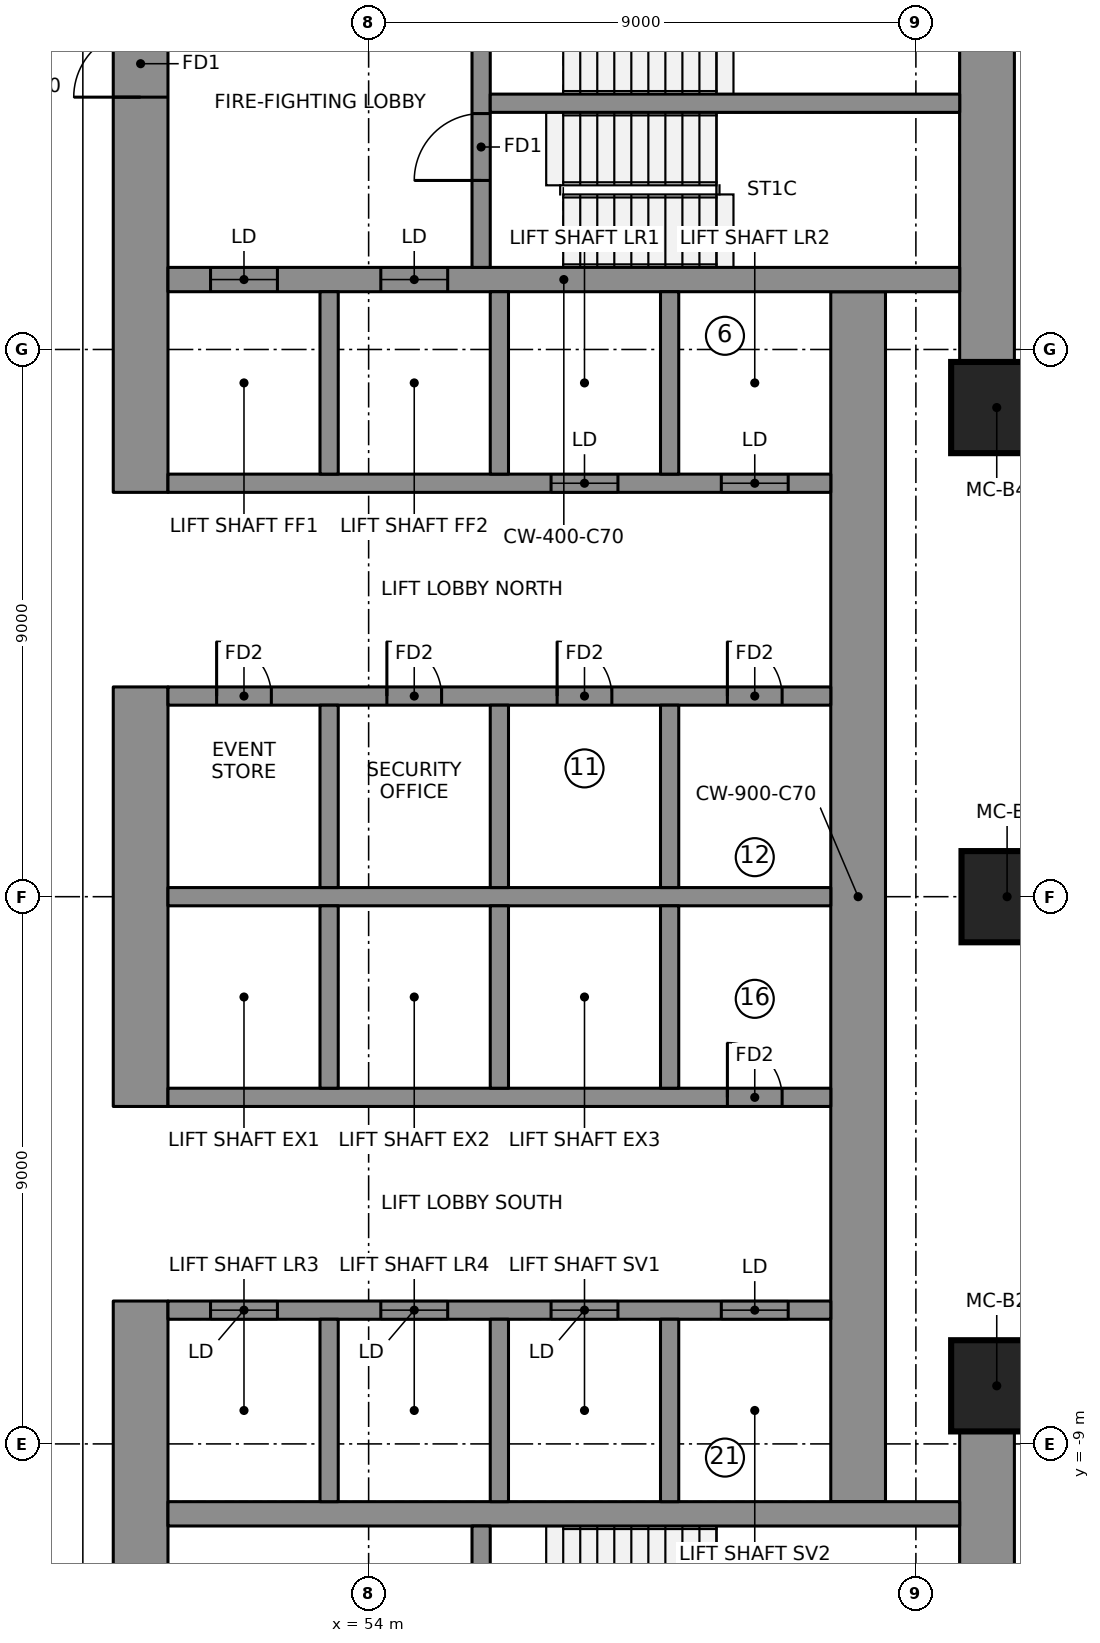
"""IFC4 building model, lengths in metres.
Left out: names, types, materials, properties, quantities, classifications, styles, units other than length and angle.
Written with IfcOpenShell. Run it as: python <this file> out.ifc"""

import sys

from ifc_helpers import new_model, si_unit, direction, frame, frame_2d, origin, origin_2d, place, context, subcontext, project, spatial, rectangle, extrude, element, fill, save


model = new_model("IFC4")
c1 = context("Model", 3, precision=1e-05, world=origin(), true_north=direction((0.0, 1.0)))
c2 = subcontext(c1, "Body", "Model", "MODEL_VIEW")
j1 = project(units=[si_unit("LENGTHUNIT", "METRE"), si_unit("PLANEANGLEUNIT", "RADIAN")], contexts=[c1])
p1 = place(None, origin())
s1 = spatial("IfcSite", under=j1, at=p1, CompositionType="ELEMENT")
p2 = place(p1, origin())
s2 = spatial("IfcBuilding", under=s1, at=p2, CompositionType="ELEMENT")
p3 = place(p2, frame((0.0, 0.0, 137.3)))
s3 = spatial("IfcBuildingStorey", under=s2, at=p3, CompositionType="ELEMENT", Elevation=137.3)
p4 = place(p3, frame((50.25, 6.65, 0.0), z_axis=(0.0, 0.0, 1.0), x_axis=(0.0, 1.0, 0.0)))
e1 = element("IfcWall", 1, at=p4, inside=s3, PredefinedType="SHEAR", context=c2, shape_type="SweptSolid", body=[
    extrude(rectangle(XDim=10.0, YDim=0.9, at=frame_2d((5.0, 0.0))), origin(), (0.0, 0.0, 1.0), 3.55),
])
p5 = place(p4, frame((6.5, 0.0, 0.0)))
e2 = element("IfcOpeningElement", 2, at=p5, cuts=e1, PredefinedType="OPENING", context=c2, shape_type="SweptSolid", body=[
    extrude(rectangle(XDim=1.1, YDim=2.1, at=frame_2d((0.55, 1.05))), frame((0.0, 0.46, 0.0), z_axis=(0.0, -1.0, 0.0), x_axis=(1.0, 0.0, 0.0)), (0.0, 0.0, 1.0), 0.92),
])
p6 = place(p3, frame((50.25, -3.45, 0.0), z_axis=(0.0, 0.0, 1.0), x_axis=(0.0, 1.0, 0.0)))
e3 = element("IfcWall", 3, at=p6, inside=s3, PredefinedType="SHEAR", context=c2, shape_type="SweptSolid", body=[
    extrude(rectangle(XDim=6.9, YDim=0.9, at=frame_2d((3.45, 0.0))), origin(), (0.0, 0.0, 1.0), 3.55),
])
p7 = place(p3, frame((50.25, -16.65, 0.0), z_axis=(0.0, 0.0, 1.0), x_axis=(0.0, 1.0, 0.0)))
e4 = element("IfcWall", 4, at=p7, inside=s3, PredefinedType="SHEAR", context=c2, shape_type="SweptSolid", body=[
    extrude(rectangle(XDim=10.0, YDim=0.9, at=frame_2d((5.0, 0.0))), origin(), (0.0, 0.0, 1.0), 3.55),
])
p8 = place(p7, frame((2.4, 0.0, 0.0)))
e5 = element("IfcOpeningElement", 5, at=p8, cuts=e4, PredefinedType="OPENING", context=c2, shape_type="SweptSolid", body=[
    extrude(rectangle(XDim=1.1, YDim=2.1, at=frame_2d((0.55, 1.05))), frame((0.0, 0.46, 0.0), z_axis=(0.0, -1.0, 0.0), x_axis=(1.0, 0.0, 0.0)), (0.0, 0.0, 1.0), 0.92),
])
for number, where, z_axis, x_axis in (
    (6, (64.17, 8.745, 0.0), (0.0, 0.0, 1.0), (0.0, 1.0, 0.0)),
    (7, (64.17, -15.75, 0.0), (0.0, 0.0, 1.0), (0.0, 1.0, 0.0)),
):
    element("IfcWall", number, at=place(p3, frame(where, z_axis=z_axis, x_axis=x_axis)), inside=s3, PredefinedType="SHEAR", context=c2, shape_type="SweptSolid", body=[
        extrude(rectangle(XDim=7.005, YDim=0.9, at=frame_2d((3.503, 0.0))), origin(), (0.0, 0.0, 1.0), 3.55),
    ])
p9 = place(p3, frame((62.05, -9.95, 0.0), z_axis=(0.0, 0.0, 1.0), x_axis=(0.0, 1.0, 0.0)))
e8 = element("IfcWall", 8, at=p9, inside=s3, PredefinedType="SHEAR", context=c2, shape_type="SweptSolid", body=[
    extrude(rectangle(XDim=19.9, YDim=0.9, at=frame_2d((9.95, 0.0))), origin(), (0.0, 0.0, 1.0), 3.55),
])
p10 = place(p3, frame((50.7, 10.15, 0.0), z_axis=(0.0, 0.0, 1.0), x_axis=(1.0, 0.0, 0.0)))
e9 = element("IfcWall", 9, at=p10, inside=s3, PredefinedType="SHEAR", context=c2, shape_type="SweptSolid", body=[
    extrude(rectangle(XDim=13.02, YDim=0.4, at=frame_2d((6.51, 0.0))), origin(), (0.0, 0.0, 1.0), 3.55),
])
p11 = place(p10, frame((0.7, 0.0, 0.0)))
e10 = element("IfcOpeningElement", 10, at=p11, cuts=e9, PredefinedType="OPENING", context=c2, shape_type="SweptSolid", body=[
    extrude(rectangle(XDim=1.1, YDim=2.1, at=frame_2d((0.55, 1.05))), frame((0.0, 0.21, 0.0), z_axis=(0.0, -1.0, 0.0), x_axis=(1.0, 0.0, 0.0)), (0.0, 0.0, 1.0), 0.42),
])
p12 = place(p10, frame((3.5, 0.0, 0.0)))
e11 = element("IfcOpeningElement", 11, at=p12, cuts=e9, PredefinedType="OPENING", context=c2, shape_type="SweptSolid", body=[
    extrude(rectangle(XDim=1.1, YDim=2.1, at=frame_2d((0.55, 1.05))), frame((0.0, 0.21, 0.0), z_axis=(0.0, -1.0, 0.0), x_axis=(1.0, 0.0, 0.0)), (0.0, 0.0, 1.0), 0.42),
])
p13 = place(p3, frame((50.7, -10.15, 0.0), z_axis=(0.0, 0.0, 1.0), x_axis=(1.0, 0.0, 0.0)))
e12 = element("IfcWall", 12, at=p13, inside=s3, PredefinedType="SHEAR", context=c2, shape_type="SweptSolid", body=[
    extrude(rectangle(XDim=13.02, YDim=0.4, at=frame_2d((6.51, 0.0))), origin(), (0.0, 0.0, 1.0), 3.55),
])
p14 = place(p3, frame((50.7, 0.0, 0.0), z_axis=(0.0, 0.0, 1.0), x_axis=(1.0, 0.0, 0.0)))
e13 = element("IfcWall", 13, at=p14, inside=s3, PredefinedType="SHEAR", context=c2, shape_type="SweptSolid", body=[
    extrude(rectangle(XDim=10.9, YDim=0.3, at=frame_2d((5.45, 0.0))), origin(), (0.0, 0.0, 1.0), 3.55),
])
p15 = place(p3, frame((50.7, 3.3, 0.0), z_axis=(0.0, 0.0, 1.0), x_axis=(1.0, 0.0, 0.0)))
e14 = element("IfcWall", 14, at=p15, inside=s3, PredefinedType="SHEAR", context=c2, shape_type="SweptSolid", body=[
    extrude(rectangle(XDim=10.9, YDim=0.3, at=frame_2d((5.45, 0.0))), origin(), (0.0, 0.0, 1.0), 3.55),
])
p16 = place(p15, frame((0.8, 0.0, 0.0)))
e15 = element("IfcOpeningElement", 15, at=p16, cuts=e14, PredefinedType="OPENING", context=c2, shape_type="SweptSolid", body=[
    extrude(rectangle(XDim=0.9, YDim=2.1, at=frame_2d((0.45, 1.05))), frame((0.0, 0.16, 0.0), z_axis=(0.0, -1.0, 0.0), x_axis=(1.0, 0.0, 0.0)), (0.0, 0.0, 1.0), 0.32),
])
p17 = place(p15, frame((3.6, 0.0, 0.0)))
e16 = element("IfcOpeningElement", 16, at=p17, cuts=e14, PredefinedType="OPENING", context=c2, shape_type="SweptSolid", body=[
    extrude(rectangle(XDim=0.9, YDim=2.1, at=frame_2d((0.45, 1.05))), frame((0.0, 0.16, 0.0), z_axis=(0.0, -1.0, 0.0), x_axis=(1.0, 0.0, 0.0)), (0.0, 0.0, 1.0), 0.32),
])
p18 = place(p15, frame((6.4, 0.0, 0.0)))
e17 = element("IfcOpeningElement", 17, at=p18, cuts=e14, PredefinedType="OPENING", context=c2, shape_type="SweptSolid", body=[
    extrude(rectangle(XDim=0.9, YDim=2.1, at=frame_2d((0.45, 1.05))), frame((0.0, 0.16, 0.0), z_axis=(0.0, -1.0, 0.0), x_axis=(1.0, 0.0, 0.0)), (0.0, 0.0, 1.0), 0.32),
])
p19 = place(p15, frame((9.2, 0.0, 0.0)))
e18 = element("IfcOpeningElement", 18, at=p19, cuts=e14, PredefinedType="OPENING", context=c2, shape_type="SweptSolid", body=[
    extrude(rectangle(XDim=0.9, YDim=2.1, at=frame_2d((0.45, 1.05))), frame((0.0, 0.16, 0.0), z_axis=(0.0, -1.0, 0.0), x_axis=(1.0, 0.0, 0.0)), (0.0, 0.0, 1.0), 0.32),
])
p20 = place(p3, frame((50.7, 6.8, 0.0), z_axis=(0.0, 0.0, 1.0), x_axis=(1.0, 0.0, 0.0)))
e19 = element("IfcWall", 19, at=p20, inside=s3, PredefinedType="SHEAR", context=c2, shape_type="SweptSolid", body=[
    extrude(rectangle(XDim=10.9, YDim=0.3, at=frame_2d((5.45, 0.0))), origin(), (0.0, 0.0, 1.0), 3.55),
])
p21 = place(p20, frame((6.3, 0.0, 0.0)))
e20 = element("IfcOpeningElement", 20, at=p21, cuts=e19, PredefinedType="OPENING", context=c2, shape_type="SweptSolid", body=[
    extrude(rectangle(XDim=1.1, YDim=2.1, at=frame_2d((0.55, 1.05))), frame((0.0, 0.16, 0.0), z_axis=(0.0, -1.0, 0.0), x_axis=(1.0, 0.0, 0.0)), (0.0, 0.0, 1.0), 0.32),
])
p22 = place(p20, frame((9.1, 0.0, 0.0)))
e21 = element("IfcOpeningElement", 21, at=p22, cuts=e19, PredefinedType="OPENING", context=c2, shape_type="SweptSolid", body=[
    extrude(rectangle(XDim=1.1, YDim=2.1, at=frame_2d((0.55, 1.05))), frame((0.0, 0.16, 0.0), z_axis=(0.0, -1.0, 0.0), x_axis=(1.0, 0.0, 0.0)), (0.0, 0.0, 1.0), 0.32),
])
for number, where, z_axis, x_axis in (
    (22, (53.35, 0.15, 0.0), (0.0, 0.0, 1.0), (0.0, 1.0, 0.0)),
    (23, (53.35, 6.95, 0.0), (0.0, 0.0, 1.0), (0.0, 1.0, 0.0)),
    (24, (56.15, 0.15, 0.0), (0.0, 0.0, 1.0), (0.0, 1.0, 0.0)),
    (25, (56.15, 6.95, 0.0), (0.0, 0.0, 1.0), (0.0, 1.0, 0.0)),
    (26, (58.95, 0.15, 0.0), (0.0, 0.0, 1.0), (0.0, 1.0, 0.0)),
    (27, (58.95, 6.95, 0.0), (0.0, 0.0, 1.0), (0.0, 1.0, 0.0)),
):
    element("IfcWall", number, at=place(p3, frame(where, z_axis=z_axis, x_axis=x_axis)), inside=s3, PredefinedType="SHEAR", context=c2, shape_type="SweptSolid", body=[
        extrude(rectangle(XDim=3.0, YDim=0.3, at=frame_2d((1.5, 0.0))), origin(), (0.0, 0.0, 1.0), 3.55),
    ])
p23 = place(p3, frame((50.7, -3.3, 0.0), z_axis=(0.0, 0.0, 1.0), x_axis=(1.0, 0.0, 0.0)))
e28 = element("IfcWall", 28, at=p23, inside=s3, PredefinedType="SHEAR", context=c2, shape_type="SweptSolid", body=[
    extrude(rectangle(XDim=10.9, YDim=0.3, at=frame_2d((5.45, 0.0))), origin(), (0.0, 0.0, 1.0), 3.55),
])
p24 = place(p23, frame((9.2, 0.0, 0.0)))
e29 = element("IfcOpeningElement", 29, at=p24, cuts=e28, PredefinedType="OPENING", context=c2, shape_type="SweptSolid", body=[
    extrude(rectangle(XDim=0.9, YDim=2.1, at=frame_2d((0.45, 1.05))), frame((0.0, 0.16, 0.0), z_axis=(0.0, -1.0, 0.0), x_axis=(1.0, 0.0, 0.0)), (0.0, 0.0, 1.0), 0.32),
])
p25 = place(p3, frame((50.7, -6.8, 0.0), z_axis=(0.0, 0.0, 1.0), x_axis=(1.0, 0.0, 0.0)))
e30 = element("IfcWall", 30, at=p25, inside=s3, PredefinedType="SHEAR", context=c2, shape_type="SweptSolid", body=[
    extrude(rectangle(XDim=10.9, YDim=0.3, at=frame_2d((5.45, 0.0))), origin(), (0.0, 0.0, 1.0), 3.55),
])
p26 = place(p25, frame((0.7, 0.0, 0.0)))
e31 = element("IfcOpeningElement", 31, at=p26, cuts=e30, PredefinedType="OPENING", context=c2, shape_type="SweptSolid", body=[
    extrude(rectangle(XDim=1.1, YDim=2.1, at=frame_2d((0.55, 1.05))), frame((0.0, 0.16, 0.0), z_axis=(0.0, -1.0, 0.0), x_axis=(1.0, 0.0, 0.0)), (0.0, 0.0, 1.0), 0.32),
])
p27 = place(p25, frame((3.5, 0.0, 0.0)))
e32 = element("IfcOpeningElement", 32, at=p27, cuts=e30, PredefinedType="OPENING", context=c2, shape_type="SweptSolid", body=[
    extrude(rectangle(XDim=1.1, YDim=2.1, at=frame_2d((0.55, 1.05))), frame((0.0, 0.16, 0.0), z_axis=(0.0, -1.0, 0.0), x_axis=(1.0, 0.0, 0.0)), (0.0, 0.0, 1.0), 0.32),
])
p28 = place(p25, frame((6.3, 0.0, 0.0)))
e33 = element("IfcOpeningElement", 33, at=p28, cuts=e30, PredefinedType="OPENING", context=c2, shape_type="SweptSolid", body=[
    extrude(rectangle(XDim=1.1, YDim=2.1, at=frame_2d((0.55, 1.05))), frame((0.0, 0.16, 0.0), z_axis=(0.0, -1.0, 0.0), x_axis=(1.0, 0.0, 0.0)), (0.0, 0.0, 1.0), 0.32),
])
p29 = place(p25, frame((9.1, 0.0, 0.0)))
e34 = element("IfcOpeningElement", 34, at=p29, cuts=e30, PredefinedType="OPENING", context=c2, shape_type="SweptSolid", body=[
    extrude(rectangle(XDim=1.1, YDim=2.1, at=frame_2d((0.55, 1.05))), frame((0.0, 0.16, 0.0), z_axis=(0.0, -1.0, 0.0), x_axis=(1.0, 0.0, 0.0)), (0.0, 0.0, 1.0), 0.32),
])
for number, where, z_axis, x_axis in (
    (35, (53.35, -3.15, 0.0), (0.0, 0.0, 1.0), (0.0, 1.0, 0.0)),
    (36, (53.35, -9.95, 0.0), (0.0, 0.0, 1.0), (0.0, 1.0, 0.0)),
    (37, (56.15, -3.15, 0.0), (0.0, 0.0, 1.0), (0.0, 1.0, 0.0)),
    (38, (56.15, -9.95, 0.0), (0.0, 0.0, 1.0), (0.0, 1.0, 0.0)),
    (39, (58.95, -3.15, 0.0), (0.0, 0.0, 1.0), (0.0, 1.0, 0.0)),
    (40, (58.95, -9.95, 0.0), (0.0, 0.0, 1.0), (0.0, 1.0, 0.0)),
):
    element("IfcWall", number, at=place(p3, frame(where, z_axis=z_axis, x_axis=x_axis)), inside=s3, PredefinedType="SHEAR", context=c2, shape_type="SweptSolid", body=[
        extrude(rectangle(XDim=3.0, YDim=0.3, at=frame_2d((1.5, 0.0))), origin(), (0.0, 0.0, 1.0), 3.55),
    ])
p30 = place(p3, frame((55.85, 10.35, 0.0), z_axis=(0.0, 0.0, 1.0), x_axis=(0.0, 1.0, 0.0)))
e41 = element("IfcWall", 41, at=p30, inside=s3, PredefinedType="SHEAR", context=c2, shape_type="SweptSolid", body=[
    extrude(rectangle(XDim=5.4, YDim=0.3, at=frame_2d((2.7, 0.0))), origin(), (0.0, 0.0, 1.0), 3.55),
])
p31 = place(p30, frame((1.43, 0.0, 0.0)))
e42 = element("IfcOpeningElement", 42, at=p31, cuts=e41, PredefinedType="OPENING", context=c2, shape_type="SweptSolid", body=[
    extrude(rectangle(XDim=1.1, YDim=2.1, at=frame_2d((0.55, 1.05))), frame((0.0, 0.16, 0.0), z_axis=(0.0, -1.0, 0.0), x_axis=(1.0, 0.0, 0.0)), (0.0, 0.0, 1.0), 0.32),
])
p32 = place(p30, frame((3.6, 0.0, 0.0)))
e43 = element("IfcOpeningElement", 43, at=p32, cuts=e41, PredefinedType="OPENING", context=c2, shape_type="SweptSolid", body=[
    extrude(rectangle(XDim=1.1, YDim=2.1, at=frame_2d((0.55, 1.05))), frame((0.0, 0.16, 0.0), z_axis=(0.0, -1.0, 0.0), x_axis=(1.0, 0.0, 0.0)), (0.0, 0.0, 1.0), 0.32),
])
p33 = place(p3, frame((55.85, -15.75, 0.0), z_axis=(0.0, 0.0, 1.0), x_axis=(0.0, 1.0, 0.0)))
e44 = element("IfcWall", 44, at=p33, inside=s3, PredefinedType="SHEAR", context=c2, shape_type="SweptSolid", body=[
    extrude(rectangle(XDim=5.4, YDim=0.3, at=frame_2d((2.7, 0.0))), origin(), (0.0, 0.0, 1.0), 3.55),
])
p34 = place(p33, frame((3.6, 0.0, 0.0)))
e45 = element("IfcOpeningElement", 45, at=p34, cuts=e44, PredefinedType="OPENING", context=c2, shape_type="SweptSolid", body=[
    extrude(rectangle(XDim=1.1, YDim=2.1, at=frame_2d((0.55, 1.05))), frame((0.0, 0.16, 0.0), z_axis=(0.0, -1.0, 0.0), x_axis=(1.0, 0.0, 0.0)), (0.0, 0.0, 1.0), 0.32),
])
p35 = place(p33, frame((0.8, 0.0, 0.0)))
e46 = element("IfcOpeningElement", 46, at=p35, cuts=e44, PredefinedType="OPENING", context=c2, shape_type="SweptSolid", body=[
    extrude(rectangle(XDim=0.9, YDim=2.1, at=frame_2d((0.45, 1.05))), frame((0.0, 0.16, 0.0), z_axis=(0.0, -1.0, 0.0), x_axis=(1.0, 0.0, 0.0)), (0.0, 0.0, 1.0), 0.32),
])
p36 = place(p3, frame((56.0, 13.05, 0.0), z_axis=(0.0, 0.0, 1.0), x_axis=(1.0, 0.0, 0.0)))
e47 = element("IfcWall", 47, at=p36, inside=s3, PredefinedType="SHEAR", context=c2, shape_type="SweptSolid", body=[
    extrude(rectangle(XDim=7.72, YDim=0.3, at=frame_2d((3.86, 0.0))), origin(), (0.0, 0.0, 1.0), 3.55),
])
for number, where, z_axis, x_axis in (
    (48, (64.33, -8.045, 0.0), (0.0, 0.0, 1.0), (1.0, 0.0, 0.0)),
    (49, (64.5, 0.0, 0.0), (0.0, 0.0, 1.0), (1.0, 0.0, 0.0)),
    (50, (64.33, 8.045, 0.0), (0.0, 0.0, 1.0), (1.0, 0.0, 0.0)),
):
    element("IfcColumn", number, at=place(p3, frame(where, z_axis=z_axis, x_axis=x_axis)), inside=s3, PredefinedType="COLUMN", context=c2, shape_type="SweptSolid", body=[
        extrude(rectangle(XDim=1.5, YDim=1.5, at=origin_2d()), origin(), (0.0, 0.0, 1.0), 3.55),
    ])
p37 = place(p11, origin())
e51 = element("IfcDoor", 51, at=p37, inside=s3, OperationType="DOUBLE_DOOR_SLIDING", PredefinedType="DOOR", context=c2, shape_type="SweptSolid", body=[
    extrude(rectangle(XDim=1.1, YDim=2.1, at=frame_2d((0.55, 1.05))), frame((0.0, 0.025, 0.0), z_axis=(0.0, -1.0, 0.0), x_axis=(1.0, 0.0, 0.0)), (0.0, 0.0, 1.0), 0.05),
])
fill(e10, e51)
p38 = place(p12, origin())
e52 = element("IfcDoor", 52, at=p38, inside=s3, OperationType="DOUBLE_DOOR_SLIDING", PredefinedType="DOOR", context=c2, shape_type="SweptSolid", body=[
    extrude(rectangle(XDim=1.1, YDim=2.1, at=frame_2d((0.55, 1.05))), frame((0.0, 0.025, 0.0), z_axis=(0.0, -1.0, 0.0), x_axis=(1.0, 0.0, 0.0)), (0.0, 0.0, 1.0), 0.05),
])
fill(e11, e52)
p39 = place(p21, origin())
e53 = element("IfcDoor", 53, at=p39, inside=s3, OperationType="DOUBLE_DOOR_SLIDING", PredefinedType="DOOR", context=c2, shape_type="SweptSolid", body=[
    extrude(rectangle(XDim=1.1, YDim=2.1, at=frame_2d((0.55, 1.05))), frame((0.0, 0.025, 0.0), z_axis=(0.0, -1.0, 0.0), x_axis=(1.0, 0.0, 0.0)), (0.0, 0.0, 1.0), 0.05),
])
fill(e20, e53)
p40 = place(p22, origin())
e54 = element("IfcDoor", 54, at=p40, inside=s3, OperationType="DOUBLE_DOOR_SLIDING", PredefinedType="DOOR", context=c2, shape_type="SweptSolid", body=[
    extrude(rectangle(XDim=1.1, YDim=2.1, at=frame_2d((0.55, 1.05))), frame((0.0, 0.025, 0.0), z_axis=(0.0, -1.0, 0.0), x_axis=(1.0, 0.0, 0.0)), (0.0, 0.0, 1.0), 0.05),
])
fill(e21, e54)
p41 = place(p26, origin())
e55 = element("IfcDoor", 55, at=p41, inside=s3, OperationType="DOUBLE_DOOR_SLIDING", PredefinedType="DOOR", context=c2, shape_type="SweptSolid", body=[
    extrude(rectangle(XDim=1.1, YDim=2.1, at=frame_2d((0.55, 1.05))), frame((0.0, 0.025, 0.0), z_axis=(0.0, -1.0, 0.0), x_axis=(1.0, 0.0, 0.0)), (0.0, 0.0, 1.0), 0.05),
])
fill(e31, e55)
p42 = place(p27, origin())
e56 = element("IfcDoor", 56, at=p42, inside=s3, OperationType="DOUBLE_DOOR_SLIDING", PredefinedType="DOOR", context=c2, shape_type="SweptSolid", body=[
    extrude(rectangle(XDim=1.1, YDim=2.1, at=frame_2d((0.55, 1.05))), frame((0.0, 0.025, 0.0), z_axis=(0.0, -1.0, 0.0), x_axis=(1.0, 0.0, 0.0)), (0.0, 0.0, 1.0), 0.05),
])
fill(e32, e56)
p43 = place(p28, origin())
e57 = element("IfcDoor", 57, at=p43, inside=s3, OperationType="DOUBLE_DOOR_SLIDING", PredefinedType="DOOR", context=c2, shape_type="SweptSolid", body=[
    extrude(rectangle(XDim=1.1, YDim=2.1, at=frame_2d((0.55, 1.05))), frame((0.0, 0.025, 0.0), z_axis=(0.0, -1.0, 0.0), x_axis=(1.0, 0.0, 0.0)), (0.0, 0.0, 1.0), 0.05),
])
fill(e33, e57)
p44 = place(p29, origin())
e58 = element("IfcDoor", 58, at=p44, inside=s3, OperationType="DOUBLE_DOOR_SLIDING", PredefinedType="DOOR", context=c2, shape_type="SweptSolid", body=[
    extrude(rectangle(XDim=1.1, YDim=2.1, at=frame_2d((0.55, 1.05))), frame((0.0, 0.025, 0.0), z_axis=(0.0, -1.0, 0.0), x_axis=(1.0, 0.0, 0.0)), (0.0, 0.0, 1.0), 0.05),
])
fill(e34, e58)
p45 = place(p31, origin())
e59 = element("IfcDoor", 59, at=p45, inside=s3, OperationType="SINGLE_SWING_RIGHT", PredefinedType="DOOR", context=c2, shape_type="SweptSolid", body=[
    extrude(rectangle(XDim=1.1, YDim=2.1, at=frame_2d((0.55, 1.05))), frame((0.0, 0.025, 0.0), z_axis=(0.0, -1.0, 0.0), x_axis=(1.0, 0.0, 0.0)), (0.0, 0.0, 1.0), 0.05),
])
fill(e42, e59)
p46 = place(p5, origin())
e60 = element("IfcDoor", 60, at=p46, inside=s3, OperationType="SINGLE_SWING_RIGHT", PredefinedType="DOOR", context=c2, shape_type="SweptSolid", body=[
    extrude(rectangle(XDim=1.1, YDim=2.1, at=frame_2d((0.55, 1.05))), frame((0.0, 0.025, 0.0), z_axis=(0.0, -1.0, 0.0), x_axis=(1.0, 0.0, 0.0)), (0.0, 0.0, 1.0), 0.05),
])
fill(e2, e60)
p47 = place(p16, origin())
e61 = element("IfcDoor", 61, at=p47, inside=s3, OperationType="SINGLE_SWING_LEFT", PredefinedType="DOOR", context=c2, shape_type="SweptSolid", body=[
    extrude(rectangle(XDim=0.9, YDim=2.1, at=frame_2d((0.45, 1.05))), frame((0.0, 0.025, 0.0), z_axis=(0.0, -1.0, 0.0), x_axis=(1.0, 0.0, 0.0)), (0.0, 0.0, 1.0), 0.05),
])
fill(e15, e61)
p48 = place(p17, origin())
e62 = element("IfcDoor", 62, at=p48, inside=s3, OperationType="SINGLE_SWING_LEFT", PredefinedType="DOOR", context=c2, shape_type="SweptSolid", body=[
    extrude(rectangle(XDim=0.9, YDim=2.1, at=frame_2d((0.45, 1.05))), frame((0.0, 0.025, 0.0), z_axis=(0.0, -1.0, 0.0), x_axis=(1.0, 0.0, 0.0)), (0.0, 0.0, 1.0), 0.05),
])
fill(e16, e62)
p49 = place(p18, origin())
e63 = element("IfcDoor", 63, at=p49, inside=s3, OperationType="SINGLE_SWING_LEFT", PredefinedType="DOOR", context=c2, shape_type="SweptSolid", body=[
    extrude(rectangle(XDim=0.9, YDim=2.1, at=frame_2d((0.45, 1.05))), frame((0.0, 0.025, 0.0), z_axis=(0.0, -1.0, 0.0), x_axis=(1.0, 0.0, 0.0)), (0.0, 0.0, 1.0), 0.05),
])
fill(e17, e63)
p50 = place(p19, origin())
e64 = element("IfcDoor", 64, at=p50, inside=s3, OperationType="SINGLE_SWING_LEFT", PredefinedType="DOOR", context=c2, shape_type="SweptSolid", body=[
    extrude(rectangle(XDim=0.9, YDim=2.1, at=frame_2d((0.45, 1.05))), frame((0.0, 0.025, 0.0), z_axis=(0.0, -1.0, 0.0), x_axis=(1.0, 0.0, 0.0)), (0.0, 0.0, 1.0), 0.05),
])
fill(e18, e64)
p51 = place(p24, origin())
e65 = element("IfcDoor", 65, at=p51, inside=s3, OperationType="SINGLE_SWING_LEFT", PredefinedType="DOOR", context=c2, shape_type="SweptSolid", body=[
    extrude(rectangle(XDim=0.9, YDim=2.1, at=frame_2d((0.45, 1.05))), frame((0.0, 0.025, 0.0), z_axis=(0.0, -1.0, 0.0), x_axis=(1.0, 0.0, 0.0)), (0.0, 0.0, 1.0), 0.05),
])
fill(e29, e65)
save(model, sys.argv[1])
